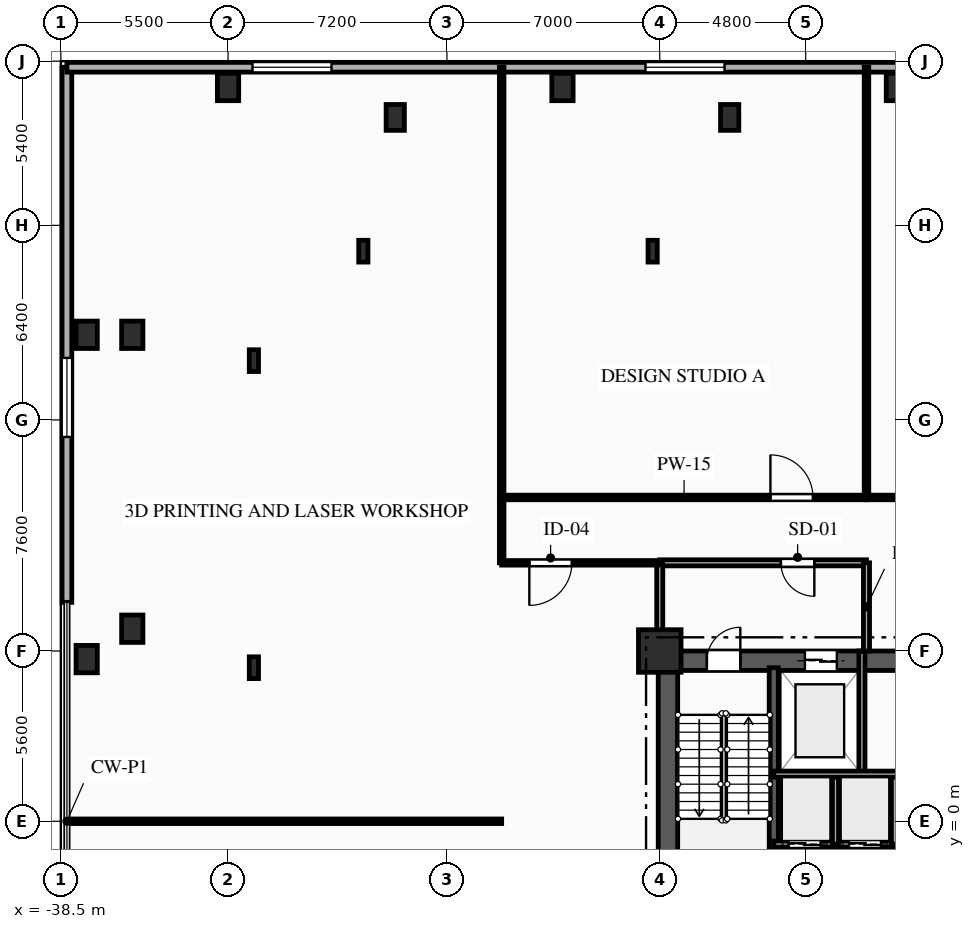
"""IFC4 building model, lengths in metres.
Left out: names, types, materials, properties, quantities, classifications, styles, units other than length and angle.
Written with IfcOpenShell. Run it as: python <this file> out.ifc"""

import sys

from ifc_helpers import new_model, si_unit, direction, frame, frame_2d, origin, origin_2d, place, context, subcontext, project, spatial, rectangle, i_section, extrude, element, fill, save


model = new_model("IFC4")
c1 = context("Model", 3, precision=1e-05, world=origin(), true_north=direction((0.0, 1.0)))
c2 = subcontext(c1, "Body", "Model", "MODEL_VIEW")
j1 = project(units=[si_unit("LENGTHUNIT", "METRE"), si_unit("PLANEANGLEUNIT", "RADIAN")], contexts=[c1])
p1 = place(None, origin())
s1 = spatial("IfcSite", under=j1, at=p1, CompositionType="ELEMENT")
p2 = place(p1, origin())
s2 = spatial("IfcBuilding", under=s1, at=p2, CompositionType="ELEMENT")
p3 = place(p2, frame((0.0, 0.0, 9.0)))
s3 = spatial("IfcBuildingStorey", under=s2, at=p3, CompositionType="ELEMENT", Elevation=9.0)
p4 = place(p3, frame((-18.8, 5.6, 0.0), z_axis=(0.0, 0.0, 1.0), x_axis=(1.0, 0.0, 0.0)))
e1 = element("IfcColumn", 1, at=p4, inside=s3, PredefinedType="COLUMN", context=c2, shape_type="SweptSolid", body=[
    extrude(rectangle(XDim=1.4, YDim=1.4, at=origin_2d()), origin(), (0.0, 0.0, 1.0), 4.5),
])
for number, where, z_axis, x_axis in (
    (2, (-33.0, 24.15, 0.0), (0.0, 0.0, 1.0), (1.0, 0.0, 0.0)),
    (3, (-22.0, 24.15, 0.0), (0.0, 0.0, 1.0), (1.0, 0.0, 0.0)),
    (4, (-11.0, 24.15, 0.0), (0.0, 0.0, 1.0), (1.0, 0.0, 0.0)),
    (5, (-36.15, 6.333, 0.0), (0.0, 0.0, 1.0), (1.0, 0.0, 0.0)),
    (6, (-36.15, 16.0, 0.0), (0.0, 0.0, 1.0), (1.0, 0.0, 0.0)),
    (7, (-37.65, 5.333, 0.0), (0.0, 0.0, 1.0), (1.0, 0.0, 0.0)),
    (8, (-37.65, 16.0, 0.0), (0.0, 0.0, 1.0), (1.0, 0.0, 0.0)),
):
    element("IfcColumn", number, at=place(p3, frame(where, z_axis=z_axis, x_axis=x_axis)), inside=s3, PredefinedType="COLUMN", context=c2, shape_type="SweptSolid", body=[
        extrude(rectangle(XDim=0.7, YDim=0.9, at=origin_2d()), origin(), (0.0, 0.0, 1.0), 4.5),
    ])
for number, where, z_axis, x_axis in (
    (9, (-27.5, 23.15, 0.0), (0.0, 0.0, 1.0), (1.0, 0.0, 0.0)),
    (10, (-16.5, 23.15, 0.0), (0.0, 0.0, 1.0), (1.0, 0.0, 0.0)),
):
    element("IfcColumn", number, at=place(p3, frame(where, z_axis=z_axis, x_axis=x_axis)), inside=s3, PredefinedType="PILASTER", context=c2, shape_type="SweptSolid", body=[
        extrude(rectangle(XDim=0.6, YDim=0.85, at=origin_2d()), origin(), (0.0, 0.0, 1.0), 4.5),
    ])
for number, where, z_axis, x_axis in (
    (11, (-19.033, 18.75, 0.0), (0.0, 0.0, 1.0), (1.0, 0.0, 0.0)),
    (12, (-28.55, 18.75, 0.0), (0.0, 0.0, 1.0), (1.0, 0.0, 0.0)),
    (13, (-32.15, 15.15, 0.0), (0.0, 0.0, 1.0), (1.0, 0.0, 0.0)),
    (14, (-32.15, 5.05, 0.0), (0.0, 0.0, 1.0), (1.0, 0.0, 0.0)),
):
    element("IfcColumn", number, at=place(p3, frame(where, z_axis=z_axis, x_axis=x_axis)), inside=s3, PredefinedType="COLUMN", context=c2, shape_type="SweptSolid", body=[
        extrude(i_section(OverallWidth=0.304, OverallDepth=0.716, WebThickness=0.021, FlangeThickness=0.04, FilletRadius=0.027, at=origin_2d()), origin(), (0.0, 0.0, 1.0), 4.5),
    ])
p5 = place(p3, frame((-38.3, 7.2, 0.0), z_axis=(0.0, 0.0, 1.0), x_axis=(0.0, 1.0, 0.0)))
e15 = element("IfcWall", 15, at=p5, inside=s3, PredefinedType="SOLIDWALL", context=c2, shape_type="SweptSolid", body=[
    extrude(rectangle(XDim=17.6, YDim=0.32, at=frame_2d((8.8, 0.0))), origin(), (0.0, 0.0, 1.0), 4.17),
])
p6 = place(p5, frame((5.44, 0.0, 0.85)))
e16 = element("IfcOpeningElement", 16, at=p6, cuts=e15, PredefinedType="OPENING", context=c2, shape_type="SweptSolid", body=[
    extrude(rectangle(XDim=2.6, YDim=2.4, at=frame_2d((1.3, 1.2))), frame((0.0, 0.17, 0.0), z_axis=(0.0, -1.0, 0.0), x_axis=(1.0, 0.0, 0.0)), (0.0, 0.0, 1.0), 0.34),
])
p7 = place(p3, frame((-38.3, 24.8, 0.0), z_axis=(0.0, 0.0, 1.0), x_axis=(1.0, 0.0, 0.0)))
e17 = element("IfcWall", 17, at=p7, inside=s3, PredefinedType="SOLIDWALL", context=c2, shape_type="SweptSolid", body=[
    extrude(rectangle(XDim=76.6, YDim=0.32, at=frame_2d((38.3, 0.0))), origin(), (0.0, 0.0, 1.0), 4.17),
])
p8 = place(p7, frame((6.104, 0.0, 0.85)))
e18 = element("IfcOpeningElement", 18, at=p8, cuts=e17, PredefinedType="OPENING", context=c2, shape_type="SweptSolid", body=[
    extrude(rectangle(XDim=2.6, YDim=2.4, at=frame_2d((1.3, 1.2))), frame((0.0, 0.17, 0.0), z_axis=(0.0, -1.0, 0.0), x_axis=(1.0, 0.0, 0.0)), (0.0, 0.0, 1.0), 0.34),
])
p9 = place(p7, frame((19.031, 0.0, 0.85)))
e19 = element("IfcOpeningElement", 19, at=p9, cuts=e17, PredefinedType="OPENING", context=c2, shape_type="SweptSolid", body=[
    extrude(rectangle(XDim=2.6, YDim=2.4, at=frame_2d((1.3, 1.2))), frame((0.0, 0.17, 0.0), z_axis=(0.0, -1.0, 0.0), x_axis=(1.0, 0.0, 0.0)), (0.0, 0.0, 1.0), 0.34),
])
p10 = place(p7, frame((31.037, 0.0, 0.85)))
e20 = element("IfcOpeningElement", 20, at=p10, cuts=e17, PredefinedType="OPENING", context=c2, shape_type="SweptSolid", body=[
    extrude(rectangle(XDim=2.6, YDim=2.4, at=frame_2d((1.3, 1.2))), frame((0.0, 0.17, 0.0), z_axis=(0.0, -1.0, 0.0), x_axis=(1.0, 0.0, 0.0)), (0.0, 0.0, 1.0), 0.34),
])
p11 = place(p7, frame((43.043, 0.0, 0.85)))
e21 = element("IfcOpeningElement", 21, at=p11, cuts=e17, PredefinedType="OPENING", context=c2, shape_type="SweptSolid", body=[
    extrude(rectangle(XDim=2.6, YDim=2.4, at=frame_2d((1.3, 1.2))), frame((0.0, 0.17, 0.0), z_axis=(0.0, -1.0, 0.0), x_axis=(1.0, 0.0, 0.0)), (0.0, 0.0, 1.0), 0.34),
])
p12 = place(p7, frame((55.049, 0.0, 0.85)))
e22 = element("IfcOpeningElement", 22, at=p12, cuts=e17, PredefinedType="OPENING", context=c2, shape_type="SweptSolid", body=[
    extrude(rectangle(XDim=2.6, YDim=2.4, at=frame_2d((1.3, 1.2))), frame((0.0, 0.17, 0.0), z_axis=(0.0, -1.0, 0.0), x_axis=(1.0, 0.0, 0.0)), (0.0, 0.0, 1.0), 0.34),
])
p13 = place(p7, frame((67.976, 0.0, 0.85)))
e23 = element("IfcOpeningElement", 23, at=p13, cuts=e17, PredefinedType="OPENING", context=c2, shape_type="SweptSolid", body=[
    extrude(rectangle(XDim=2.6, YDim=2.4, at=frame_2d((1.3, 1.2))), frame((0.0, 0.17, 0.0), z_axis=(0.0, -1.0, 0.0), x_axis=(1.0, 0.0, 0.0)), (0.0, 0.0, 1.0), 0.34),
])
p14 = place(p3, frame((-18.8, 5.28, 0.0), z_axis=(0.0, 0.0, 1.0), x_axis=(1.0, 0.0, 0.0)))
e24 = element("IfcWall", 24, at=p14, inside=s3, PredefinedType="SHEAR", context=c2, shape_type="SweptSolid", body=[
    extrude(rectangle(XDim=9.6, YDim=0.64, at=frame_2d((4.8, 0.0))), origin(), (0.0, 0.0, 1.0), 4.17),
])
p15 = place(p14, frame((1.55, 0.0, 0.0)))
e25 = element("IfcOpeningElement", 25, at=p15, cuts=e24, PredefinedType="OPENING", context=c2, shape_type="SweptSolid", body=[
    extrude(rectangle(XDim=1.1, YDim=2.15, at=frame_2d((0.55, 1.075))), frame((0.0, 0.33, 0.0), z_axis=(0.0, -1.0, 0.0), x_axis=(1.0, 0.0, 0.0)), (0.0, 0.0, 1.0), 0.66),
])
p16 = place(p14, frame((4.775, 0.0, 0.0)))
e26 = element("IfcOpeningElement", 26, at=p16, cuts=e24, PredefinedType="OPENING", context=c2, shape_type="SweptSolid", body=[
    extrude(rectangle(XDim=1.05, YDim=2.1, at=frame_2d((0.525, 1.05))), frame((0.0, 0.33, 0.0), z_axis=(0.0, -1.0, 0.0), x_axis=(1.0, 0.0, 0.0)), (0.0, 0.0, 1.0), 0.66),
])
p17 = place(p3, frame((-18.53, -5.05, 0.0), z_axis=(0.0, 0.0, 1.0), x_axis=(0.0, 1.0, 0.0)))
e27 = element("IfcWall", 27, at=p17, inside=s3, PredefinedType="SHEAR", context=c2, shape_type="SweptSolid", body=[
    extrude(rectangle(XDim=10.1, YDim=0.64, at=frame_2d((5.05, 0.0))), origin(), (0.0, 0.0, 1.0), 4.17),
])
p18 = place(p3, frame((-15.05, -5.05, 0.0), z_axis=(0.0, 0.0, 1.0), x_axis=(0.0, 1.0, 0.0)))
e28 = element("IfcWall", 28, at=p18, inside=s3, PredefinedType="SHEAR", context=c2, shape_type="SweptSolid", body=[
    extrude(rectangle(XDim=10.1, YDim=0.3, at=frame_2d((5.05, 0.0))), origin(), (0.0, 0.0, 1.0), 4.17),
])
p19 = place(p3, frame((-12.15, 1.55, 0.0), z_axis=(0.0, 0.0, 1.0), x_axis=(0.0, 1.0, 0.0)))
e29 = element("IfcWall", 29, at=p19, inside=s3, PredefinedType="PARTITIONING", context=c2, shape_type="SweptSolid", body=[
    extrude(rectangle(XDim=4.05, YDim=0.2, at=frame_2d((2.025, 0.0))), origin(), (0.0, 0.0, 1.0), 4.17),
])
p20 = place(p3, frame((-12.0, 8.5, 0.0), z_axis=(0.0, 0.0, 1.0), x_axis=(-1.0, 0.0, 0.0)))
e30 = element("IfcWall", 30, at=p20, inside=s3, PredefinedType="PARTITIONING", context=c2, shape_type="SweptSolid", body=[
    extrude(rectangle(XDim=6.8, YDim=0.2, at=frame_2d((3.4, 0.0))), origin(), (0.0, 0.0, 1.0), 4.17),
])
p21 = place(p20, frame((1.715, 0.0, 0.0)))
e31 = element("IfcOpeningElement", 31, at=p21, cuts=e30, PredefinedType="OPENING", context=c2, shape_type="SweptSolid", body=[
    extrude(rectangle(XDim=1.1, YDim=2.15, at=frame_2d((0.55, 1.075))), frame((0.0, 0.11, 0.0), z_axis=(0.0, -1.0, 0.0), x_axis=(1.0, 0.0, 0.0)), (0.0, 0.0, 1.0), 0.22),
])
p22 = place(p3, frame((-12.0, 5.6, 0.0), z_axis=(0.0, 0.0, 1.0), x_axis=(0.0, 1.0, 0.0)))
e32 = element("IfcWall", 32, at=p22, inside=s3, PredefinedType="PARTITIONING", context=c2, shape_type="SweptSolid", body=[
    extrude(rectangle(XDim=2.9, YDim=0.2, at=frame_2d((1.45, 0.0))), origin(), (0.0, 0.0, 1.0), 4.17),
])
p23 = place(p3, frame((-18.8, 8.5, 0.0), z_axis=(0.0, 0.0, 1.0), x_axis=(0.0, -1.0, 0.0)))
e33 = element("IfcWall", 33, at=p23, inside=s3, PredefinedType="PARTITIONING", context=c2, shape_type="SweptSolid", body=[
    extrude(rectangle(XDim=2.9, YDim=0.2, at=frame_2d((1.45, 0.0))), origin(), (0.0, 0.0, 1.0), 3.655),
])
p24 = place(p3, frame((-13.02, -0.75, 0.0), z_axis=(0.0, 0.0, 1.0), x_axis=(-1.0, 0.0, 0.0)))
e34 = element("IfcWall", 34, at=p24, inside=s3, PredefinedType="PARTITIONING", context=c2, shape_type="SweptSolid", body=[
    extrude(rectangle(XDim=2.03, YDim=0.2, at=frame_2d((1.015, 0.0))), origin(), (0.0, 0.0, 1.0), 4.17),
])
p25 = place(p24, frame((0.49, 0.0, 0.0)))
e35 = element("IfcOpeningElement", 35, at=p25, cuts=e34, PredefinedType="OPENING", context=c2, shape_type="SweptSolid", body=[
    extrude(rectangle(XDim=1.05, YDim=2.1, at=frame_2d((0.525, 1.05))), frame((0.0, 0.11, 0.0), z_axis=(0.0, -1.0, 0.0), x_axis=(1.0, 0.0, 0.0)), (0.0, 0.0, 1.0), 0.22),
])
p26 = place(p3, frame((-11.08, -0.75, 0.0), z_axis=(0.0, 0.0, 1.0), x_axis=(-1.0, 0.0, 0.0)))
e36 = element("IfcWall", 36, at=p26, inside=s3, PredefinedType="PARTITIONING", context=c2, shape_type="SweptSolid", body=[
    extrude(rectangle(XDim=1.94, YDim=0.2, at=frame_2d((0.97, 0.0))), origin(), (0.0, 0.0, 1.0), 4.17),
])
p27 = place(p26, frame((0.445, 0.0, 0.0)))
e37 = element("IfcOpeningElement", 37, at=p27, cuts=e36, PredefinedType="OPENING", context=c2, shape_type="SweptSolid", body=[
    extrude(rectangle(XDim=1.05, YDim=2.1, at=frame_2d((0.525, 1.05))), frame((0.0, 0.11, 0.0), z_axis=(0.0, -1.0, 0.0), x_axis=(1.0, 0.0, 0.0)), (0.0, 0.0, 1.0), 0.22),
])
p28 = place(p3, frame((-9.2, -0.75, 0.0), z_axis=(0.0, 0.0, 1.0), x_axis=(-1.0, 0.0, 0.0)))
e38 = element("IfcWall", 38, at=p28, inside=s3, PredefinedType="PARTITIONING", context=c2, shape_type="SweptSolid", body=[
    extrude(rectangle(XDim=1.88, YDim=0.2, at=frame_2d((0.94, 0.0))), origin(), (0.0, 0.0, 1.0), 4.17),
])
for number, where, z_axis, x_axis in (
    (39, (-13.02, -0.75, 0.0), (0.0, 0.0, 1.0), (0.0, 1.0, 0.0)),
    (40, (-11.08, -0.75, 0.0), (0.0, 0.0, 1.0), (0.0, 1.0, 0.0)),
):
    element("IfcWall", number, at=place(p3, frame(where, z_axis=z_axis, x_axis=x_axis)), inside=s3, PredefinedType="PARTITIONING", context=c2, shape_type="SweptSolid", body=[
        extrude(rectangle(XDim=2.3, YDim=0.2, at=frame_2d((1.15, 0.0))), origin(), (0.0, 0.0, 1.0), 4.17),
    ])
p29 = place(p3, frame((-18.8, 8.5, 0.0), z_axis=(0.0, 0.0, 1.0), x_axis=(-1.0, 0.0, 0.0)))
e41 = element("IfcWall", 41, at=p29, inside=s3, PredefinedType="PARTITIONING", context=c2, shape_type="SweptSolid", body=[
    extrude(rectangle(XDim=5.2, YDim=0.15, at=frame_2d((2.6, 0.0))), origin(), (0.0, 0.0, 1.0), 4.17),
])
p30 = place(p29, frame((2.89, 0.0, 0.0)))
e42 = element("IfcOpeningElement", 42, at=p30, cuts=e41, PredefinedType="OPENING", context=c2, shape_type="SweptSolid", body=[
    extrude(rectangle(XDim=1.4, YDim=2.3, at=frame_2d((0.7, 1.15))), frame((0.0, 0.085, 0.0), z_axis=(0.0, -1.0, 0.0), x_axis=(1.0, 0.0, 0.0)), (0.0, 0.0, 1.0), 0.17),
])
p31 = place(p3, frame((-24.0, 8.5, 0.0), z_axis=(0.0, 0.0, 1.0), x_axis=(0.0, 1.0, 0.0)))
e43 = element("IfcWall", 43, at=p31, inside=s3, PredefinedType="PARTITIONING", context=c2, shape_type="SweptSolid", body=[
    extrude(rectangle(XDim=2.15, YDim=0.15, at=frame_2d((1.075, 0.0))), origin(), (0.0, 0.0, 1.0), 4.17),
])
p32 = place(p3, frame((-24.0, 10.65, 0.0), z_axis=(0.0, 0.0, 1.0), x_axis=(1.0, 0.0, 0.0)))
e44 = element("IfcWall", 44, at=p32, inside=s3, PredefinedType="PARTITIONING", context=c2, shape_type="SweptSolid", body=[
    extrude(rectangle(XDim=12.0, YDim=0.15, at=frame_2d((6.0, 0.0))), origin(), (0.0, 0.0, 1.0), 4.17),
])
p33 = place(p32, frame((8.84, 0.0, 0.0)))
e45 = element("IfcOpeningElement", 45, at=p33, cuts=e44, PredefinedType="OPENING", context=c2, shape_type="SweptSolid", body=[
    extrude(rectangle(XDim=1.4, YDim=2.3, at=frame_2d((0.7, 1.15))), frame((0.0, 0.085, 0.0), z_axis=(0.0, -1.0, 0.0), x_axis=(1.0, 0.0, 0.0)), (0.0, 0.0, 1.0), 0.17),
])
p34 = place(p3, frame((-12.0, 10.65, 0.0), z_axis=(0.0, 0.0, 1.0), x_axis=(1.0, 0.0, 0.0)))
e46 = element("IfcWall", 46, at=p34, inside=s3, PredefinedType="PARTITIONING", context=c2, shape_type="SweptSolid", body=[
    extrude(rectangle(XDim=12.0, YDim=0.15, at=frame_2d((6.0, 0.0))), origin(), (0.0, 0.0, 1.0), 4.17),
])
p35 = place(p34, frame((8.84, 0.0, 0.0)))
e47 = element("IfcOpeningElement", 47, at=p35, cuts=e46, PredefinedType="OPENING", context=c2, shape_type="SweptSolid", body=[
    extrude(rectangle(XDim=1.4, YDim=2.3, at=frame_2d((0.7, 1.15))), frame((0.0, 0.085, 0.0), z_axis=(0.0, -1.0, 0.0), x_axis=(1.0, 0.0, 0.0)), (0.0, 0.0, 1.0), 0.17),
])
p36 = place(p3, frame((-38.3, 0.0, 0.0), z_axis=(0.0, 0.0, 1.0), x_axis=(1.0, 0.0, 0.0)))
e48 = element("IfcWall", 48, at=p36, inside=s3, PredefinedType="PARTITIONING", context=c2, shape_type="SweptSolid", body=[
    extrude(rectangle(XDim=14.3, YDim=0.15, at=frame_2d((7.15, 0.0))), origin(), (0.0, 0.0, 1.0), 4.17),
])
for number, where, z_axis, x_axis in (
    (49, (-24.0, 24.8, 0.0), (0.0, 0.0, 1.0), (0.0, -1.0, 0.0)),
    (50, (-12.0, 24.8, 0.0), (0.0, 0.0, 1.0), (0.0, -1.0, 0.0)),
):
    element("IfcWall", number, at=place(p3, frame(where, z_axis=z_axis, x_axis=x_axis)), inside=s3, PredefinedType="PARTITIONING", context=c2, shape_type="SweptSolid", body=[
        extrude(rectangle(XDim=14.15, YDim=0.15, at=frame_2d((7.075, 0.0))), origin(), (0.0, 0.0, 1.0), 4.17),
    ])
p37 = place(p3, frame((-15.05, 1.55, 0.0), z_axis=(0.0, 0.0, 1.0), x_axis=(1.0, 0.0, 0.0)))
e51 = element("IfcWall", 51, at=p37, inside=s3, PredefinedType="PARTITIONING", context=c2, shape_type="SweptSolid", body=[
    extrude(rectangle(XDim=5.85, YDim=0.2, at=frame_2d((2.925, 0.0))), origin(), (0.0, 0.0, 1.0), 4.17),
])
p38 = place(p6, origin())
e52 = element("IfcWindow", 52, at=p38, inside=s3, PartitioningType="SINGLE_PANEL", PredefinedType="WINDOW", context=c2, shape_type="SweptSolid", body=[
    extrude(rectangle(XDim=2.6, YDim=2.4, at=frame_2d((1.3, 1.2))), frame((0.0, 0.03, 0.0), z_axis=(0.0, -1.0, 0.0), x_axis=(1.0, 0.0, 0.0)), (0.0, 0.0, 1.0), 0.06),
])
fill(e16, e52)
p39 = place(p8, origin())
e53 = element("IfcWindow", 53, at=p39, inside=s3, PartitioningType="SINGLE_PANEL", PredefinedType="WINDOW", context=c2, shape_type="SweptSolid", body=[
    extrude(rectangle(XDim=2.6, YDim=2.4, at=frame_2d((1.3, 1.2))), frame((0.0, 0.03, 0.0), z_axis=(0.0, -1.0, 0.0), x_axis=(1.0, 0.0, 0.0)), (0.0, 0.0, 1.0), 0.06),
])
fill(e18, e53)
p40 = place(p9, origin())
e54 = element("IfcWindow", 54, at=p40, inside=s3, PartitioningType="SINGLE_PANEL", PredefinedType="WINDOW", context=c2, shape_type="SweptSolid", body=[
    extrude(rectangle(XDim=2.6, YDim=2.4, at=frame_2d((1.3, 1.2))), frame((0.0, 0.03, 0.0), z_axis=(0.0, -1.0, 0.0), x_axis=(1.0, 0.0, 0.0)), (0.0, 0.0, 1.0), 0.06),
])
fill(e19, e54)
p41 = place(p15, origin())
e55 = element("IfcDoor", 55, at=p41, inside=s3, OperationType="SINGLE_SWING_RIGHT", PredefinedType="DOOR", context=c2, shape_type="SweptSolid", body=[
    extrude(rectangle(XDim=1.1, YDim=2.15, at=frame_2d((0.55, 1.075))), frame((0.0, 0.025, 0.0), z_axis=(0.0, -1.0, 0.0), x_axis=(1.0, 0.0, 0.0)), (0.0, 0.0, 1.0), 0.05),
])
fill(e25, e55)
p42 = place(p16, origin())
e56 = element("IfcDoor", 56, at=p42, inside=s3, OperationType="DOUBLE_DOOR_SLIDING", PredefinedType="DOOR", context=c2, shape_type="SweptSolid", body=[
    extrude(rectangle(XDim=1.05, YDim=2.1, at=frame_2d((0.525, 1.05))), frame((0.0, 0.025, 0.0), z_axis=(0.0, -1.0, 0.0), x_axis=(1.0, 0.0, 0.0)), (0.0, 0.0, 1.0), 0.05),
])
fill(e26, e56)
p43 = place(p21, origin())
e57 = element("IfcDoor", 57, at=p43, inside=s3, OperationType="SINGLE_SWING_LEFT", PredefinedType="DOOR", context=c2, shape_type="SweptSolid", body=[
    extrude(rectangle(XDim=1.1, YDim=2.15, at=frame_2d((0.55, 1.075))), frame((0.0, 0.025, 0.0), z_axis=(0.0, -1.0, 0.0), x_axis=(1.0, 0.0, 0.0)), (0.0, 0.0, 1.0), 0.05),
])
fill(e31, e57)
p44 = place(p25, origin())
e58 = element("IfcDoor", 58, at=p44, inside=s3, OperationType="DOUBLE_DOOR_SLIDING", PredefinedType="DOOR", context=c2, shape_type="SweptSolid", body=[
    extrude(rectangle(XDim=1.05, YDim=2.1, at=frame_2d((0.525, 1.05))), frame((0.0, 0.025, 0.0), z_axis=(0.0, -1.0, 0.0), x_axis=(1.0, 0.0, 0.0)), (0.0, 0.0, 1.0), 0.05),
])
fill(e35, e58)
p45 = place(p27, origin())
e59 = element("IfcDoor", 59, at=p45, inside=s3, OperationType="DOUBLE_DOOR_SLIDING", PredefinedType="DOOR", context=c2, shape_type="SweptSolid", body=[
    extrude(rectangle(XDim=1.05, YDim=2.1, at=frame_2d((0.525, 1.05))), frame((0.0, 0.025, 0.0), z_axis=(0.0, -1.0, 0.0), x_axis=(1.0, 0.0, 0.0)), (0.0, 0.0, 1.0), 0.05),
])
fill(e37, e59)
p46 = place(p30, origin())
e60 = element("IfcDoor", 60, at=p46, inside=s3, OperationType="SINGLE_SWING_RIGHT", PredefinedType="DOOR", context=c2, shape_type="SweptSolid", body=[
    extrude(rectangle(XDim=1.4, YDim=2.3, at=frame_2d((0.7, 1.15))), frame((0.0, 0.025, 0.0), z_axis=(0.0, -1.0, 0.0), x_axis=(1.0, 0.0, 0.0)), (0.0, 0.0, 1.0), 0.05),
])
fill(e42, e60)
p47 = place(p33, origin())
e61 = element("IfcDoor", 61, at=p47, inside=s3, OperationType="SINGLE_SWING_LEFT", PredefinedType="DOOR", context=c2, shape_type="SweptSolid", body=[
    extrude(rectangle(XDim=1.4, YDim=2.3, at=frame_2d((0.7, 1.15))), frame((0.0, 0.025, 0.0), z_axis=(0.0, -1.0, 0.0), x_axis=(1.0, 0.0, 0.0)), (0.0, 0.0, 1.0), 0.05),
])
fill(e45, e61)
save(model, sys.argv[1])
